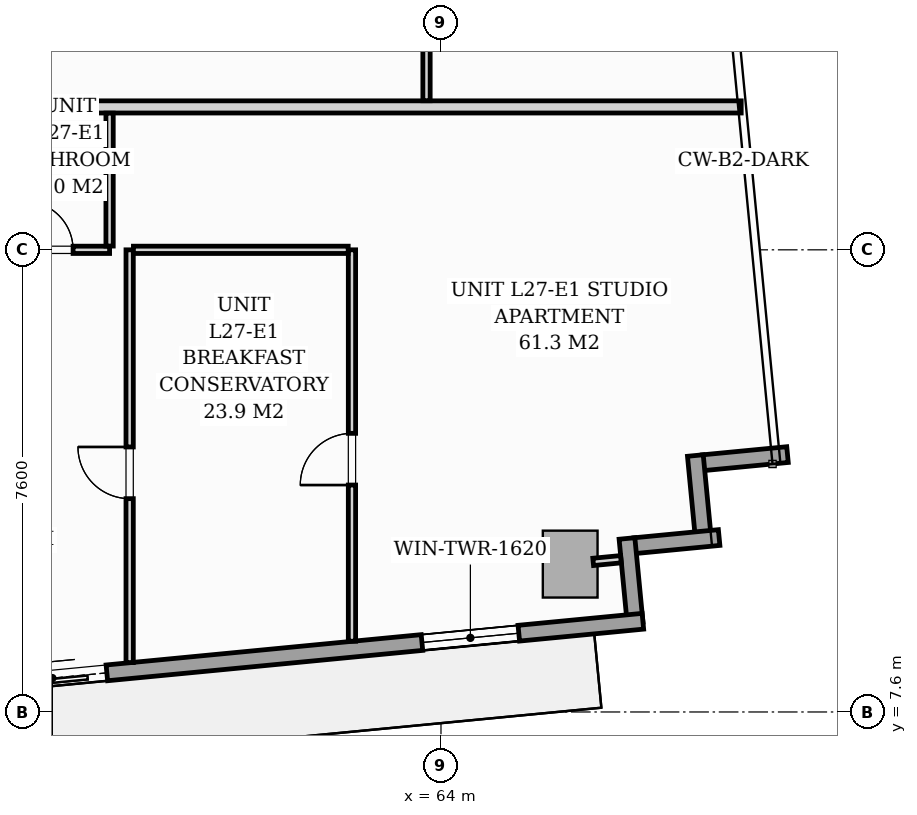
"""IFC4 building model, lengths in metres.
Left out: names, types, materials, properties, quantities, classifications, styles, units other than length and angle.
Written with IfcOpenShell. Run it as: python <this file> out.ifc"""

import sys

from ifc_helpers import new_model, si_unit, direction, frame, frame_2d, origin, origin_2d, place, context, subcontext, project, spatial, rectangle, extrude, source, transform, mapped, element, fill, save


model = new_model("IFC4")
c1 = context("Model", 3, precision=1e-05, world=origin(), true_north=direction((0.0, 1.0)))
c2 = subcontext(c1, "Body", "Model", "MODEL_VIEW")
j1 = project(units=[si_unit("LENGTHUNIT", "METRE"), si_unit("PLANEANGLEUNIT", "RADIAN")], contexts=[c1])
p1 = place(None, origin())
s1 = spatial("IfcSite", under=j1, at=p1, CompositionType="ELEMENT")
p2 = place(p1, origin())
s2 = spatial("IfcBuilding", under=s1, at=p2, CompositionType="ELEMENT")
p3 = place(p2, frame((0.0, 0.0, 97.0)))
s3 = spatial("IfcBuildingStorey", under=s2, at=p3, CompositionType="ELEMENT", Elevation=97.0)
m1 = source(origin(), c2, "Body", "SweptSolid", [
    extrude(rectangle(XDim=0.9, YDim=1.1, at=origin_2d()), origin(), (0.0, 0.0, 1.0), 3.196),
])
for number, where, z_axis, x_axis in (
    (1, (66.125, 10.032, 0.002), (0.0, 0.0, 1.0), (0.995, 0.096, 0.0)),
    (2, (67.648, 19.039, 0.002), (0.0, 0.0, 1.0), (0.995, 0.096, 0.0)),
):
    element("IfcColumn", number, at=place(p3, frame(where, z_axis=z_axis, x_axis=x_axis)), inside=s3, PredefinedType="COLUMN", context=c2, shape_type="MappedRepresentation", body=[
        mapped(m1, transform((0.0, 0.0, 0.0), scale=1.0)),
    ])
for number, where, z_axis, x_axis in (
    (3, (69.698, 11.833, 0.0), (0.0, 0.0, 1.0), (-0.995, -0.096, 0.0)),
    (4, (68.183, 11.817, 0.0), (0.0, 0.0, 1.0), (0.096, -0.995, 0.0)),
):
    element("IfcWall", number, at=place(p3, frame(where, z_axis=z_axis, x_axis=x_axis)), inside=s3, PredefinedType="STANDARD", context=c2, shape_type="SweptSolid", body=[
        extrude(rectangle(XDim=1.395, YDim=0.26, at=frame_2d((0.697, 0.0))), origin(), (0.0, 0.0, 1.0), 2.94),
    ])
p4 = place(p3, frame((68.574, 10.469, 0.0), z_axis=(0.0, 0.0, 1.0), x_axis=(-0.99540774648, -0.095725744959, 0.0)))
e5 = element("IfcWall", 5, at=p4, inside=s3, PredefinedType="STANDARD", context=c2, shape_type="SweptSolid", body=[
    extrude(rectangle(XDim=1.395, YDim=0.26, at=frame_2d((0.698, 0.0))), origin(), (0.0, 0.0, 1.0), 2.94),
])
p5 = place(p3, frame((67.059, 10.453, 0.0), z_axis=(0.0, 0.0, 1.0), x_axis=(0.095915846097, -0.995389446633, 0.0)))
e6 = element("IfcWall", 6, at=p5, inside=s3, PredefinedType="STANDARD", context=c2, shape_type="SweptSolid", body=[
    extrude(rectangle(XDim=1.395, YDim=0.26, at=frame_2d((0.697, 0.0))), origin(), (0.0, 0.0, 1.0), 2.94),
])
p6 = place(p3, frame((67.32, 9.092, 0.0), z_axis=(0.0, 0.0, 1.0), x_axis=(-0.995396521236, -0.095842399342, 0.0)))
e7 = element("IfcWall", 7, at=p6, inside=s3, PredefinedType="STANDARD", context=c2, shape_type="SweptSolid", body=[
    extrude(rectangle(XDim=19.11, YDim=0.26, at=frame_2d((9.555, 0.0))), origin(), (0.0, 0.0, 1.0), 2.94),
])
p7 = place(p6, frame((8.856, 0.0, 0.0)))
e8 = element("IfcOpeningElement", 8, at=p7, cuts=e7, PredefinedType="OPENING", context=c2, shape_type="SweptSolid", body=[
    extrude(rectangle(XDim=1.8, YDim=2.06, at=frame_2d((0.9, 1.03))), frame((0.0, 0.14, 0.0), z_axis=(0.0, -1.0, 0.0), x_axis=(1.0, 0.0, 0.0)), (0.0, 0.0, 1.0), 0.28),
])
p8 = place(p6, frame((2.05, 0.0, 0.65)))
e9 = element("IfcOpeningElement", 9, at=p8, cuts=e7, PredefinedType="OPENING", context=c2, shape_type="SweptSolid", body=[
    extrude(rectangle(XDim=1.6, YDim=1.5, at=frame_2d((0.8, 0.75))), frame((0.0, 0.14, 0.0), z_axis=(0.0, -1.0, 0.0), x_axis=(1.0, 0.0, 0.0)), (0.0, 0.0, 1.0), 0.28),
])
p9 = place(p6, frame((14.438, 0.0, 0.75)))
e10 = element("IfcOpeningElement", 10, at=p9, cuts=e7, PredefinedType="OPENING", context=c2, shape_type="SweptSolid", body=[
    extrude(rectangle(XDim=1.6, YDim=1.5, at=frame_2d((0.8, 0.75))), frame((0.0, 0.14, 0.0), z_axis=(0.0, -1.0, 0.0), x_axis=(1.0, 0.0, 0.0)), (0.0, 0.0, 1.0), 0.28),
])
p10 = place(p3, frame((54.282, 17.55, 0.0), z_axis=(0.0, 0.0, 1.0), x_axis=(1.0, 0.0, 0.0)))
e11 = element("IfcWall", 11, at=p10, inside=s3, PredefinedType="PARTITIONING", context=c2, shape_type="SweptSolid", body=[
    extrude(rectangle(XDim=14.655, YDim=0.2, at=frame_2d((7.328, 0.0))), origin(), (0.0, 0.0, 1.0), 2.94),
])
p11 = place(p3, frame((54.35, 15.2, 0.0), z_axis=(0.0, 0.0, 1.0), x_axis=(1.0, 0.0, 0.0)))
e12 = element("IfcWall", 12, at=p11, inside=s3, PredefinedType="PARTITIONING", context=c2, shape_type="SweptSolid", body=[
    extrude(rectangle(XDim=4.2, YDim=0.12, at=frame_2d((2.1, 0.0))), origin(), (0.0, 0.0, 1.0), 2.94),
])
p12 = place(p11, frame((0.675, 0.0, 0.0)))
e13 = element("IfcOpeningElement", 13, at=p12, cuts=e12, PredefinedType="OPENING", context=c2, shape_type="SweptSolid", body=[
    extrude(rectangle(XDim=0.85, YDim=2.05, at=frame_2d((0.425, 1.025))), frame((0.0, 0.07, 0.0), z_axis=(0.0, -1.0, 0.0), x_axis=(1.0, 0.0, 0.0)), (0.0, 0.0, 1.0), 0.14),
])
p13 = place(p11, frame((2.8, 0.0, 0.0)))
e14 = element("IfcOpeningElement", 14, at=p13, cuts=e12, PredefinedType="OPENING", context=c2, shape_type="SweptSolid", body=[
    extrude(rectangle(XDim=0.8, YDim=2.02, at=frame_2d((0.4, 1.01))), frame((0.0, 0.07, 0.0), z_axis=(0.0, -1.0, 0.0), x_axis=(1.0, 0.0, 0.0)), (0.0, 0.0, 1.0), 0.14),
])
p14 = place(p3, frame((58.55, 15.262, 0.0), z_axis=(0.0, 0.0, 1.0), x_axis=(0.0, 1.0, 0.0)))
e15 = element("IfcWall", 15, at=p14, inside=s3, PredefinedType="PARTITIONING", context=c2, shape_type="SweptSolid", body=[
    extrude(rectangle(XDim=2.186, YDim=0.12, at=frame_2d((1.093, 0.0))), origin(), (0.0, 0.0, 1.0), 2.94),
])
p15 = place(p3, frame((58.88, 8.412, 0.0), z_axis=(0.0, 0.0, 1.0), x_axis=(0.0, 1.0, 0.0)))
e16 = element("IfcWall", 16, at=p15, inside=s3, PredefinedType="PARTITIONING", context=c2, shape_type="SweptSolid", body=[
    extrude(rectangle(XDim=6.788, YDim=0.12, at=frame_2d((3.394, 0.0))), origin(), (0.0, 0.0, 1.0), 2.94),
])
p16 = place(p15, frame((2.696, 0.0, 0.0)))
e17 = element("IfcOpeningElement", 17, at=p16, cuts=e16, PredefinedType="OPENING", context=c2, shape_type="SweptSolid", body=[
    extrude(rectangle(XDim=0.85, YDim=2.05, at=frame_2d((0.425, 1.025))), frame((0.0, 0.07, 0.0), z_axis=(0.0, -1.0, 0.0), x_axis=(1.0, 0.0, 0.0)), (0.0, 0.0, 1.0), 0.14),
])
p17 = place(p3, frame((62.536, 8.764, 0.0), z_axis=(0.0, 0.0, 1.0), x_axis=(0.0, 1.0, 0.0)))
e18 = element("IfcWall", 18, at=p17, inside=s3, PredefinedType="PARTITIONING", context=c2, shape_type="SweptSolid", body=[
    extrude(rectangle(XDim=6.436, YDim=0.12, at=frame_2d((3.218, 0.0))), origin(), (0.0, 0.0, 1.0), 2.94),
])
p18 = place(p17, frame((2.568, 0.0, 0.0)))
e19 = element("IfcOpeningElement", 19, at=p18, cuts=e18, PredefinedType="OPENING", context=c2, shape_type="SweptSolid", body=[
    extrude(rectangle(XDim=0.85, YDim=2.05, at=frame_2d((0.425, 1.025))), frame((0.0, 0.07, 0.0), z_axis=(0.0, -1.0, 0.0), x_axis=(1.0, 0.0, 0.0)), (0.0, 0.0, 1.0), 0.14),
])
p19 = place(p3, frame((58.942, 15.2, 0.0), z_axis=(0.0, 0.0, 1.0), x_axis=(1.0, 0.0, 0.0)))
e20 = element("IfcWall", 20, at=p19, inside=s3, PredefinedType="PARTITIONING", context=c2, shape_type="SweptSolid", body=[
    extrude(rectangle(XDim=3.532, YDim=0.12, at=frame_2d((1.766, 0.0))), origin(), (0.0, 0.0, 1.0), 2.94),
])
p20 = place(p3, frame((63.762, 17.652, 0.0), z_axis=(0.0, 0.0, 1.0), x_axis=(0.0, 1.0, 0.0)))
e21 = element("IfcWall", 21, at=p20, inside=s3, PredefinedType="PARTITIONING", context=c2, shape_type="SweptSolid", body=[
    extrude(rectangle(XDim=7.541, YDim=0.12, at=frame_2d((3.771, 0.0))), origin(), (0.0, 0.0, 1.0), 2.94),
])
p21 = place(p20, frame((3.345, 0.0, 0.0)))
e22 = element("IfcOpeningElement", 22, at=p21, cuts=e21, PredefinedType="OPENING", context=c2, shape_type="SweptSolid", body=[
    extrude(rectangle(XDim=0.85, YDim=2.05, at=frame_2d((0.425, 1.025))), frame((0.0, 0.07, 0.0), z_axis=(0.0, -1.0, 0.0), x_axis=(1.0, 0.0, 0.0)), (0.0, 0.0, 1.0), 0.14),
])
p22 = place(p3, frame((66.503, 10.068, 0.0), z_axis=(0.0, 0.0, 1.0), x_axis=(0.995389482415, 0.095915474751, 0.0)))
e23 = element("IfcWall", 23, at=p22, inside=s3, PredefinedType="PARTITIONING", context=c2, shape_type="SweptSolid", body=[
    extrude(rectangle(XDim=0.458, YDim=0.12, at=frame_2d((0.229, 0.0))), origin(), (0.0, 0.0, 1.0), 2.94),
])
m2 = source(origin(), c2, "Body", "SweptSolid", [
    extrude(rectangle(XDim=1.8, YDim=2.06, at=frame_2d((0.9, 1.03))), frame((0.0, 0.025, 0.0), z_axis=(0.0, -1.0, 0.0), x_axis=(1.0, 0.0, 0.0)), (0.0, 0.0, 1.0), 0.05),
])
p23 = place(p7, origin())
e24 = element("IfcDoor", 24, at=p23, inside=s3, OperationType="SLIDING_TO_RIGHT", PredefinedType="DOOR", context=c2, shape_type="MappedRepresentation", body=[
    mapped(m2, transform((0.0, 0.0, 0.0), scale=1.0)),
])
fill(e8, e24)
m3 = source(origin(), c2, "Body", "SweptSolid", [
    extrude(rectangle(XDim=1.6, YDim=1.5, at=frame_2d((0.8, 0.75))), frame((0.0, 0.03, 0.0), z_axis=(0.0, -1.0, 0.0), x_axis=(1.0, 0.0, 0.0)), (0.0, 0.0, 1.0), 0.06),
])
p24 = place(p8, origin())
e25 = element("IfcWindow", 25, at=p24, inside=s3, PartitioningType="SINGLE_PANEL", PredefinedType="WINDOW", context=c2, shape_type="MappedRepresentation", body=[
    mapped(m3, transform((0.0, 0.0, 0.0), scale=1.0)),
])
fill(e9, e25)
m4 = source(origin(), c2, "Body", "SweptSolid", [
    extrude(rectangle(XDim=0.85, YDim=2.05, at=frame_2d((0.425, 1.025))), frame((0.0, 0.025, 0.0), z_axis=(0.0, -1.0, 0.0), x_axis=(1.0, 0.0, 0.0)), (0.0, 0.0, 1.0), 0.05),
])
p25 = place(p16, origin())
e26 = element("IfcDoor", 26, at=p25, inside=s3, OperationType="SINGLE_SWING_RIGHT", PredefinedType="DOOR", context=c2, shape_type="MappedRepresentation", body=[
    mapped(m4, transform((0.0, 0.0, 0.0), scale=1.0)),
])
fill(e17, e26)
p26 = place(p18, origin())
e27 = element("IfcDoor", 27, at=p26, inside=s3, OperationType="SINGLE_SWING_LEFT", PredefinedType="DOOR", context=c2, shape_type="MappedRepresentation", body=[
    mapped(m4, transform((0.0, 0.0, 0.0), scale=1.0)),
])
fill(e19, e27)
m5 = source(origin(), c2, "Body", "SweptSolid", [
    extrude(rectangle(XDim=0.8, YDim=2.02, at=frame_2d((0.4, 1.01))), frame((0.0, 0.025, 0.0), z_axis=(0.0, -1.0, 0.0), x_axis=(1.0, 0.0, 0.0)), (0.0, 0.0, 1.0), 0.05),
])
p27 = place(p13, origin())
e28 = element("IfcDoor", 28, at=p27, inside=s3, OperationType="SINGLE_SWING_LEFT", PredefinedType="DOOR", context=c2, shape_type="MappedRepresentation", body=[
    mapped(m5, transform((0.0, 0.0, 0.0), scale=1.0)),
])
fill(e14, e28)
save(model, sys.argv[1])
